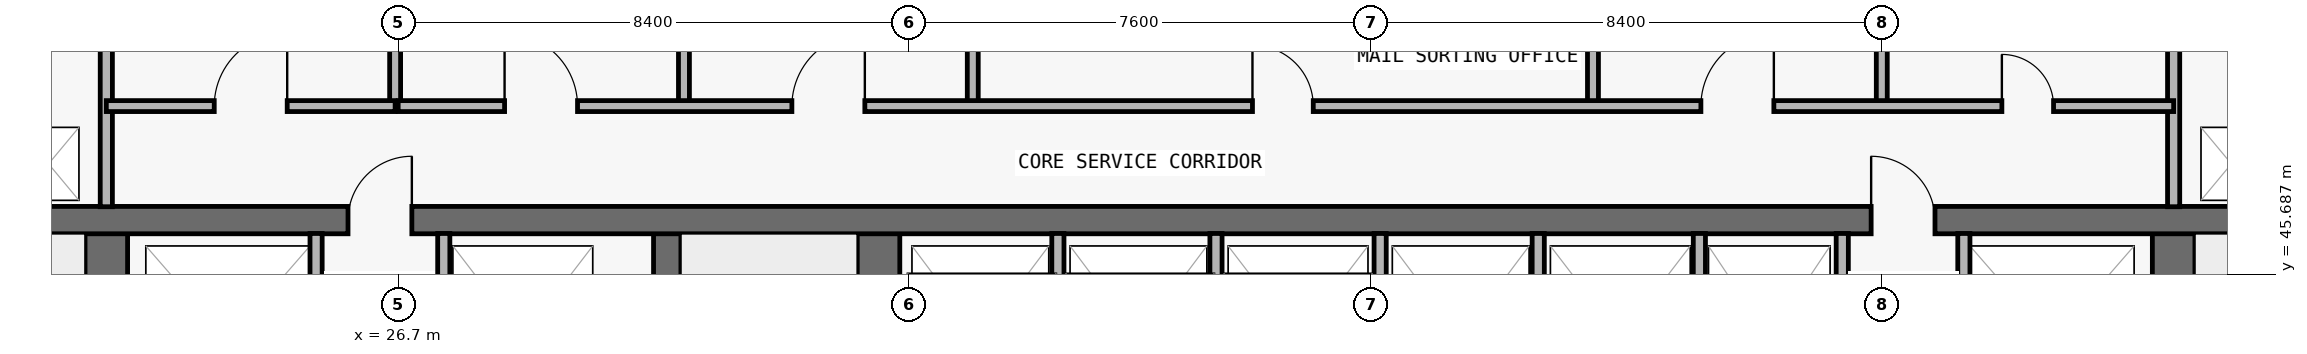
"""IFC4 building model, lengths in metres.
Left out: names, types, materials, properties, quantities, classifications, styles, units other than length and angle.
Written with IfcOpenShell. Run it as: python <this file> out.ifc"""

import sys

from ifc_helpers import new_model, si_unit, direction, frame, frame_2d, origin, place, context, subcontext, project, spatial, rectangle, extrude, element, fill, save


model = new_model("IFC4")
c1 = context("Model", 3, precision=1e-05, world=origin(), true_north=direction((0.0, 1.0)))
c2 = subcontext(c1, "Body", "Model", "MODEL_VIEW")
j1 = project(units=[si_unit("LENGTHUNIT", "METRE"), si_unit("PLANEANGLEUNIT", "RADIAN")], contexts=[c1])
p1 = place(None, origin())
s1 = spatial("IfcSite", under=j1, at=p1, CompositionType="ELEMENT")
p2 = place(p1, origin())
s2 = spatial("IfcBuilding", under=s1, at=p2, CompositionType="ELEMENT")
p3 = place(p2, frame((0.0, 0.0, 63.0)))
s3 = spatial("IfcBuildingStorey", under=s2, at=p3, CompositionType="ELEMENT", Elevation=63.0)
p4 = place(p3, frame((21.9, 36.9, 0.0), z_axis=(0.0, 0.0, 1.0), x_axis=(0.0, 1.0, 0.0)))
e1 = element("IfcWall", 1, at=p4, inside=s3, PredefinedType="SHEAR", context=c2, shape_type="SweptSolid", body=[
    extrude(rectangle(XDim=9.675, YDim=0.7, at=frame_2d((4.837, 0.0))), origin(), (0.0, 0.0, 1.0), 3.05),
])
p5 = place(p4, frame((0.65, 0.0, 0.0)))
e2 = element("IfcOpeningElement", 2, at=p5, cuts=e1, PredefinedType="OPENING", context=c2, shape_type="SweptSolid", body=[
    extrude(rectangle(XDim=1.1, YDim=2.15, at=frame_2d((0.55, 1.075))), frame((0.0, 0.36, 0.0), z_axis=(0.0, -1.0, 0.0), x_axis=(1.0, 0.0, 0.0)), (0.0, 0.0, 1.0), 0.72),
])
p6 = place(p3, frame((55.9, 36.9, 0.0), z_axis=(0.0, 0.0, 1.0), x_axis=(0.0, 1.0, 0.0)))
e3 = element("IfcWall", 3, at=p6, inside=s3, PredefinedType="SHEAR", context=c2, shape_type="SweptSolid", body=[
    extrude(rectangle(XDim=9.675, YDim=0.7, at=frame_2d((4.837, 0.0))), origin(), (0.0, 0.0, 1.0), 3.05),
])
p7 = place(p6, frame((0.65, 0.0, 0.0)))
e4 = element("IfcOpeningElement", 4, at=p7, cuts=e3, PredefinedType="OPENING", context=c2, shape_type="SweptSolid", body=[
    extrude(rectangle(XDim=1.1, YDim=2.15, at=frame_2d((0.55, 1.075))), frame((0.0, 0.36, 0.0), z_axis=(0.0, -1.0, 0.0), x_axis=(1.0, 0.0, 0.0)), (0.0, 0.0, 1.0), 0.72),
])
p8 = place(p3, frame((31.125, 36.9, 0.0), z_axis=(0.0, 0.0, 1.0), x_axis=(0.0, 1.0, 0.0)))
e5 = element("IfcWall", 5, at=p8, inside=s3, PredefinedType="SHEAR", context=c2, shape_type="SweptSolid", body=[
    extrude(rectangle(XDim=9.675, YDim=0.45, at=frame_2d((4.837, 0.0))), origin(), (0.0, 0.0, 1.0), 3.05),
])
p9 = place(p3, frame((34.6, 36.9, 0.0), z_axis=(0.0, 0.0, 1.0), x_axis=(0.0, 1.0, 0.0)))
e6 = element("IfcWall", 6, at=p9, inside=s3, PredefinedType="SHEAR", context=c2, shape_type="SweptSolid", body=[
    extrude(rectangle(XDim=9.675, YDim=0.7, at=frame_2d((4.837, 0.0))), origin(), (0.0, 0.0, 1.0), 3.05),
])
p10 = place(p3, frame((18.2, 46.575, 0.0), z_axis=(0.0, 0.0, 1.0), x_axis=(1.0, 0.0, 0.0)))
e7 = element("IfcWall", 7, at=p10, inside=s3, PredefinedType="SHEAR", context=c2, shape_type="SweptSolid", body=[
    extrude(rectangle(XDim=41.4, YDim=0.45, at=frame_2d((20.7, 0.0))), origin(), (0.0, 0.0, 1.0), 3.05),
])
p11 = place(p10, frame((7.675, 0.0, 0.0)))
e8 = element("IfcOpeningElement", 8, at=p11, cuts=e7, PredefinedType="OPENING", context=c2, shape_type="SweptSolid", body=[
    extrude(rectangle(XDim=1.05, YDim=2.15, at=frame_2d((0.525, 1.075))), frame((0.0, 0.235, 0.0), z_axis=(0.0, -1.0, 0.0), x_axis=(1.0, 0.0, 0.0)), (0.0, 0.0, 1.0), 0.47),
])
p12 = place(p10, frame((32.725, 0.0, 0.0)))
e9 = element("IfcOpeningElement", 9, at=p12, cuts=e7, PredefinedType="OPENING", context=c2, shape_type="SweptSolid", body=[
    extrude(rectangle(XDim=1.05, YDim=2.15, at=frame_2d((0.525, 1.075))), frame((0.0, 0.235, 0.0), z_axis=(0.0, -1.0, 0.0), x_axis=(1.0, 0.0, 0.0)), (0.0, 0.0, 1.0), 0.47),
])
p13 = place(p3, frame((21.9, 46.795, 0.0), z_axis=(0.0, 0.0, 1.0), x_axis=(0.0, 1.0, 0.0)))
e10 = element("IfcWall", 10, at=p13, inside=s3, PredefinedType="PARTITIONING", context=c2, shape_type="SweptSolid", body=[
    extrude(rectangle(XDim=3.06, YDim=0.2, at=frame_2d((1.53, 0.0))), origin(), (0.0, 0.0, 1.0), 3.05),
])
p14 = place(p3, frame((25.35, 43.17, 0.0), z_axis=(0.0, 0.0, 1.0), x_axis=(0.0, 1.0, 0.0)))
e11 = element("IfcWall", 11, at=p14, inside=s3, PredefinedType="PARTITIONING", context=c2, shape_type="SweptSolid", body=[
    extrude(rectangle(XDim=3.185, YDim=0.2, at=frame_2d((1.593, 0.0))), origin(), (0.0, 0.0, 1.0), 3.05),
])
p15 = place(p3, frame((26.65, 48.45, 0.0), z_axis=(0.0, 0.0, 1.0), x_axis=(0.0, 1.0, 0.0)))
e12 = element("IfcWall", 12, at=p15, inside=s3, PredefinedType="PARTITIONING", context=c2, shape_type="SweptSolid", body=[
    extrude(rectangle(XDim=1.405, YDim=0.18, at=frame_2d((0.703, 0.0))), origin(), (0.0, 0.0, 1.0), 3.05),
])
p16 = place(p3, frame((27.45, 43.17, 0.0), z_axis=(0.0, 0.0, 1.0), x_axis=(0.0, 1.0, 0.0)))
e13 = element("IfcWall", 13, at=p16, inside=s3, PredefinedType="PARTITIONING", context=c2, shape_type="SweptSolid", body=[
    extrude(rectangle(XDim=3.185, YDim=0.2, at=frame_2d((1.593, 0.0))), origin(), (0.0, 0.0, 1.0), 3.05),
])
for number, where, z_axis, x_axis in (
    (14, (31.4, 48.45, 0.0), (0.0, 0.0, 1.0), (0.0, 1.0, 0.0)),
    (15, (36.15, 48.45, 0.0), (0.0, 0.0, 1.0), (0.0, 1.0, 0.0)),
):
    element("IfcWall", number, at=place(p3, frame(where, z_axis=z_axis, x_axis=x_axis)), inside=s3, PredefinedType="PARTITIONING", context=c2, shape_type="SweptSolid", body=[
        extrude(rectangle(XDim=1.405, YDim=0.18, at=frame_2d((0.703, 0.0))), origin(), (0.0, 0.0, 1.0), 3.05),
    ])
for number, where, z_axis, x_axis in (
    (16, (37.55, 43.17, 0.0), (0.0, 0.0, 1.0), (0.0, 1.0, 0.0)),
    (17, (40.15, 43.17, 0.0), (0.0, 0.0, 1.0), (0.0, 1.0, 0.0)),
    (18, (42.85, 43.17, 0.0), (0.0, 0.0, 1.0), (0.0, 1.0, 0.0)),
    (19, (45.45, 43.17, 0.0), (0.0, 0.0, 1.0), (0.0, 1.0, 0.0)),
):
    element("IfcWall", number, at=place(p3, frame(where, z_axis=z_axis, x_axis=x_axis)), inside=s3, PredefinedType="PARTITIONING", context=c2, shape_type="SweptSolid", body=[
        extrude(rectangle(XDim=3.185, YDim=0.2, at=frame_2d((1.593, 0.0))), origin(), (0.0, 0.0, 1.0), 3.05),
    ])
p17 = place(p3, frame((46.35, 48.45, 0.0), z_axis=(0.0, 0.0, 1.0), x_axis=(0.0, 1.0, 0.0)))
e20 = element("IfcWall", 20, at=p17, inside=s3, PredefinedType="PARTITIONING", context=c2, shape_type="SweptSolid", body=[
    extrude(rectangle(XDim=1.405, YDim=0.18, at=frame_2d((0.703, 0.0))), origin(), (0.0, 0.0, 1.0), 3.05),
])
for number, where, z_axis, x_axis in (
    (21, (48.1, 43.17, 0.0), (0.0, 0.0, 1.0), (0.0, 1.0, 0.0)),
    (22, (50.45, 43.17, 0.0), (0.0, 0.0, 1.0), (0.0, 1.0, 0.0)),
):
    element("IfcWall", number, at=place(p3, frame(where, z_axis=z_axis, x_axis=x_axis)), inside=s3, PredefinedType="PARTITIONING", context=c2, shape_type="SweptSolid", body=[
        extrude(rectangle(XDim=3.185, YDim=0.2, at=frame_2d((1.593, 0.0))), origin(), (0.0, 0.0, 1.0), 3.05),
    ])
p18 = place(p3, frame((51.1, 48.45, 0.0), z_axis=(0.0, 0.0, 1.0), x_axis=(0.0, 1.0, 0.0)))
e23 = element("IfcWall", 23, at=p18, inside=s3, PredefinedType="PARTITIONING", context=c2, shape_type="SweptSolid", body=[
    extrude(rectangle(XDim=1.405, YDim=0.18, at=frame_2d((0.703, 0.0))), origin(), (0.0, 0.0, 1.0), 3.05),
])
p19 = place(p3, frame((52.45, 43.17, 0.0), z_axis=(0.0, 0.0, 1.0), x_axis=(0.0, 1.0, 0.0)))
e24 = element("IfcWall", 24, at=p19, inside=s3, PredefinedType="PARTITIONING", context=c2, shape_type="SweptSolid", body=[
    extrude(rectangle(XDim=3.185, YDim=0.2, at=frame_2d((1.593, 0.0))), origin(), (0.0, 0.0, 1.0), 3.05),
])
p20 = place(p3, frame((55.9, 46.795, 0.0), z_axis=(0.0, 0.0, 1.0), x_axis=(0.0, 1.0, 0.0)))
e25 = element("IfcWall", 25, at=p20, inside=s3, PredefinedType="PARTITIONING", context=c2, shape_type="SweptSolid", body=[
    extrude(rectangle(XDim=3.06, YDim=0.2, at=frame_2d((1.53, 0.0))), origin(), (0.0, 0.0, 1.0), 3.05),
])
p21 = place(p3, frame((21.9, 48.45, 0.0), z_axis=(0.0, 0.0, 1.0), x_axis=(1.0, 0.0, 0.0)))
e26 = element("IfcWall", 26, at=p21, inside=s3, PredefinedType="PARTITIONING", context=c2, shape_type="SweptSolid", body=[
    extrude(rectangle(XDim=4.75, YDim=0.18, at=frame_2d((2.375, 0.0))), origin(), (0.0, 0.0, 1.0), 3.05),
])
p22 = place(p21, frame((1.775, 0.0, 0.0)))
e27 = element("IfcOpeningElement", 27, at=p22, cuts=e26, PredefinedType="OPENING", context=c2, shape_type="SweptSolid", body=[
    extrude(rectangle(XDim=1.2, YDim=2.2, at=frame_2d((0.6, 1.1))), frame((0.0, 0.1, 0.0), z_axis=(0.0, -1.0, 0.0), x_axis=(1.0, 0.0, 0.0)), (0.0, 0.0, 1.0), 0.2),
])
p23 = place(p3, frame((26.7, 48.45, 0.0), z_axis=(0.0, 0.0, 1.0), x_axis=(1.0, 0.0, 0.0)))
e28 = element("IfcWall", 28, at=p23, inside=s3, PredefinedType="PARTITIONING", context=c2, shape_type="SweptSolid", body=[
    extrude(rectangle(XDim=29.2, YDim=0.18, at=frame_2d((14.6, 0.0))), origin(), (0.0, 0.0, 1.0), 3.05),
])
p24 = place(p23, frame((1.75, 0.0, 0.0)))
e29 = element("IfcOpeningElement", 29, at=p24, cuts=e28, PredefinedType="OPENING", context=c2, shape_type="SweptSolid", body=[
    extrude(rectangle(XDim=1.2, YDim=2.2, at=frame_2d((0.6, 1.1))), frame((0.0, 0.1, 0.0), z_axis=(0.0, -1.0, 0.0), x_axis=(1.0, 0.0, 0.0)), (0.0, 0.0, 1.0), 0.2),
])
p25 = place(p23, frame((6.475, 0.0, 0.0)))
e30 = element("IfcOpeningElement", 30, at=p25, cuts=e28, PredefinedType="OPENING", context=c2, shape_type="SweptSolid", body=[
    extrude(rectangle(XDim=1.2, YDim=2.2, at=frame_2d((0.6, 1.1))), frame((0.0, 0.1, 0.0), z_axis=(0.0, -1.0, 0.0), x_axis=(1.0, 0.0, 0.0)), (0.0, 0.0, 1.0), 0.2),
])
p26 = place(p23, frame((14.05, 0.0, 0.0)))
e31 = element("IfcOpeningElement", 31, at=p26, cuts=e28, PredefinedType="OPENING", context=c2, shape_type="SweptSolid", body=[
    extrude(rectangle(XDim=1.0, YDim=2.2, at=frame_2d((0.5, 1.1))), frame((0.0, 0.1, 0.0), z_axis=(0.0, -1.0, 0.0), x_axis=(1.0, 0.0, 0.0)), (0.0, 0.0, 1.0), 0.2),
])
p27 = place(p23, frame((21.425, 0.0, 0.0)))
e32 = element("IfcOpeningElement", 32, at=p27, cuts=e28, PredefinedType="OPENING", context=c2, shape_type="SweptSolid", body=[
    extrude(rectangle(XDim=1.2, YDim=2.2, at=frame_2d((0.6, 1.1))), frame((0.0, 0.1, 0.0), z_axis=(0.0, -1.0, 0.0), x_axis=(1.0, 0.0, 0.0)), (0.0, 0.0, 1.0), 0.2),
])
p28 = place(p23, frame((26.375, 0.0, 0.0)))
e33 = element("IfcOpeningElement", 33, at=p28, cuts=e28, PredefinedType="OPENING", context=c2, shape_type="SweptSolid", body=[
    extrude(rectangle(XDim=0.85, YDim=2.1, at=frame_2d((0.425, 1.05))), frame((0.0, 0.1, 0.0), z_axis=(0.0, -1.0, 0.0), x_axis=(1.0, 0.0, 0.0)), (0.0, 0.0, 1.0), 0.2),
])
p29 = place(p11, origin())
e34 = element("IfcDoor", 34, at=p29, inside=s3, OperationType="SINGLE_SWING_RIGHT", PredefinedType="DOOR", context=c2, shape_type="SweptSolid", body=[
    extrude(rectangle(XDim=1.05, YDim=2.15, at=frame_2d((0.525, 1.075))), frame((0.0, 0.025, 0.0), z_axis=(0.0, -1.0, 0.0), x_axis=(1.0, 0.0, 0.0)), (0.0, 0.0, 1.0), 0.05),
])
fill(e8, e34)
p30 = place(p12, origin())
e35 = element("IfcDoor", 35, at=p30, inside=s3, OperationType="SINGLE_SWING_LEFT", PredefinedType="DOOR", context=c2, shape_type="SweptSolid", body=[
    extrude(rectangle(XDim=1.05, YDim=2.15, at=frame_2d((0.525, 1.075))), frame((0.0, 0.025, 0.0), z_axis=(0.0, -1.0, 0.0), x_axis=(1.0, 0.0, 0.0)), (0.0, 0.0, 1.0), 0.05),
])
fill(e9, e35)
p31 = place(p22, origin())
e36 = element("IfcDoor", 36, at=p31, inside=s3, OperationType="SINGLE_SWING_RIGHT", PredefinedType="DOOR", context=c2, shape_type="SweptSolid", body=[
    extrude(rectangle(XDim=1.2, YDim=2.2, at=frame_2d((0.6, 1.1))), frame((0.0, 0.025, 0.0), z_axis=(0.0, -1.0, 0.0), x_axis=(1.0, 0.0, 0.0)), (0.0, 0.0, 1.0), 0.05),
])
fill(e27, e36)
p32 = place(p24, origin())
e37 = element("IfcDoor", 37, at=p32, inside=s3, OperationType="SINGLE_SWING_LEFT", PredefinedType="DOOR", context=c2, shape_type="SweptSolid", body=[
    extrude(rectangle(XDim=1.2, YDim=2.2, at=frame_2d((0.6, 1.1))), frame((0.0, 0.025, 0.0), z_axis=(0.0, -1.0, 0.0), x_axis=(1.0, 0.0, 0.0)), (0.0, 0.0, 1.0), 0.05),
])
fill(e29, e37)
p33 = place(p25, origin())
e38 = element("IfcDoor", 38, at=p33, inside=s3, OperationType="SINGLE_SWING_RIGHT", PredefinedType="DOOR", context=c2, shape_type="SweptSolid", body=[
    extrude(rectangle(XDim=1.2, YDim=2.2, at=frame_2d((0.6, 1.1))), frame((0.0, 0.025, 0.0), z_axis=(0.0, -1.0, 0.0), x_axis=(1.0, 0.0, 0.0)), (0.0, 0.0, 1.0), 0.05),
])
fill(e30, e38)
p34 = place(p26, origin())
e39 = element("IfcDoor", 39, at=p34, inside=s3, OperationType="SINGLE_SWING_LEFT", PredefinedType="DOOR", context=c2, shape_type="SweptSolid", body=[
    extrude(rectangle(XDim=1.0, YDim=2.2, at=frame_2d((0.5, 1.1))), frame((0.0, 0.025, 0.0), z_axis=(0.0, -1.0, 0.0), x_axis=(1.0, 0.0, 0.0)), (0.0, 0.0, 1.0), 0.05),
])
fill(e31, e39)
p35 = place(p27, origin())
e40 = element("IfcDoor", 40, at=p35, inside=s3, OperationType="SINGLE_SWING_RIGHT", PredefinedType="DOOR", context=c2, shape_type="SweptSolid", body=[
    extrude(rectangle(XDim=1.2, YDim=2.2, at=frame_2d((0.6, 1.1))), frame((0.0, 0.025, 0.0), z_axis=(0.0, -1.0, 0.0), x_axis=(1.0, 0.0, 0.0)), (0.0, 0.0, 1.0), 0.05),
])
fill(e32, e40)
p36 = place(p28, origin())
e41 = element("IfcDoor", 41, at=p36, inside=s3, OperationType="SINGLE_SWING_LEFT", PredefinedType="DOOR", context=c2, shape_type="SweptSolid", body=[
    extrude(rectangle(XDim=0.85, YDim=2.1, at=frame_2d((0.425, 1.05))), frame((0.0, 0.025, 0.0), z_axis=(0.0, -1.0, 0.0), x_axis=(1.0, 0.0, 0.0)), (0.0, 0.0, 1.0), 0.05),
])
fill(e33, e41)
save(model, sys.argv[1])
